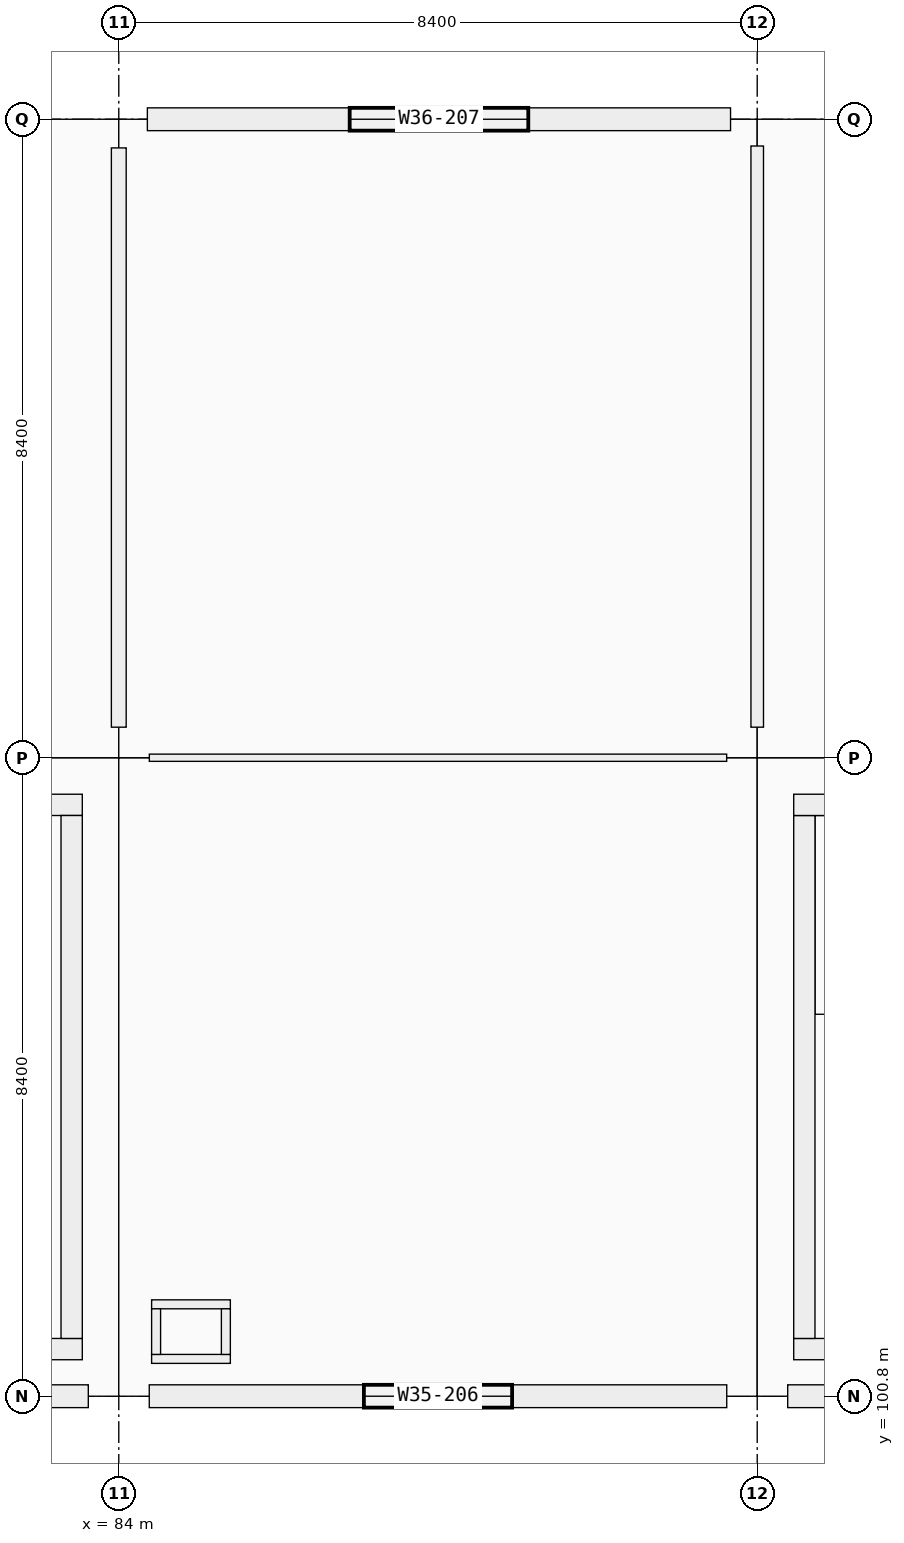
"""IFC4 building model, lengths in metres.
Left out: names, types, materials, properties, quantities, classifications, styles, units other than length and angle.
Written with IfcOpenShell. Run it as: python <this file> out.ifc"""

import sys

from ifc_helpers import new_model, si_unit, direction, frame, frame_2d, origin, origin_2d, place, context, subcontext, project, spatial, rectangle, extrude, element, fill, save


model = new_model("IFC4")
c1 = context("Model", 3, precision=1e-05, world=origin(), true_north=direction((0.0, 1.0)))
c2 = subcontext(c1, "Body", "Model", "MODEL_VIEW")
j1 = project(units=[si_unit("LENGTHUNIT", "METRE"), si_unit("PLANEANGLEUNIT", "RADIAN")], contexts=[c1])
p1 = place(None, origin())
s1 = spatial("IfcSite", under=j1, at=p1, CompositionType="ELEMENT")
p2 = place(p1, origin())
s2 = spatial("IfcBuilding", under=s1, at=p2, CompositionType="ELEMENT")
p3 = place(p2, frame((0.0, 0.0, 14.76)))
s3 = spatial("IfcBuildingStorey", under=s2, at=p3, CompositionType="ELEMENT", Elevation=14.76)
for number, where, z_axis, x_axis in (
    (1, (84.0, 100.8, 0.0), (0.0, 0.0, 1.0), (1.0, 0.0, 0.0)),
    (2, (84.0, 109.2, 0.0), (0.0, 0.0, 1.0), (1.0, 0.0, 0.0)),
):
    element("IfcColumn", number, at=place(p3, frame(where, z_axis=z_axis, x_axis=x_axis)), inside=s3, PredefinedType="COLUMN", context=c2, shape_type="SweptSolid", body=[
        extrude(rectangle(XDim=0.8, YDim=0.8, at=origin_2d()), origin(), (0.0, 0.0, 1.0), 4.32),
    ])
p4 = place(p3, frame((84.0, 117.6, 0.0), z_axis=(0.0, 0.0, 1.0), x_axis=(1.0, 0.0, 0.0)))
e3 = element("IfcColumn", 3, at=p4, inside=s3, PredefinedType="COLUMN", context=c2, shape_type="SweptSolid", body=[
    extrude(rectangle(XDim=0.75, YDim=0.75, at=origin_2d()), origin(), (0.0, 0.0, 1.0), 4.32),
])
for number, where, z_axis, x_axis in (
    (4, (92.4, 100.8, 0.0), (0.0, 0.0, 1.0), (1.0, 0.0, 0.0)),
    (5, (92.4, 109.2, 0.0), (0.0, 0.0, 1.0), (1.0, 0.0, 0.0)),
):
    element("IfcColumn", number, at=place(p3, frame(where, z_axis=z_axis, x_axis=x_axis)), inside=s3, PredefinedType="COLUMN", context=c2, shape_type="SweptSolid", body=[
        extrude(rectangle(XDim=0.8, YDim=0.8, at=origin_2d()), origin(), (0.0, 0.0, 1.0), 4.32),
    ])
p5 = place(p3, frame((92.4, 117.6, 0.0), z_axis=(0.0, 0.0, 1.0), x_axis=(1.0, 0.0, 0.0)))
e6 = element("IfcColumn", 6, at=p5, inside=s3, PredefinedType="COLUMN", context=c2, shape_type="SweptSolid", body=[
    extrude(rectangle(XDim=0.7, YDim=0.7, at=origin_2d()), origin(), (0.0, 0.0, 1.0), 4.32),
])
p6 = place(p3, frame((83.599, 100.8, 0.0), z_axis=(0.0, 0.0, 1.0), x_axis=(-1.0, 0.0, 0.0)))
e7 = element("IfcWall", 7, at=p6, inside=s3, PredefinedType="SOLIDWALL", context=c2, shape_type="SweptSolid", body=[
    extrude(rectangle(XDim=7.598, YDim=0.3, at=frame_2d((3.799, 0.0))), origin(), (0.0, 0.0, 1.0), 3.37),
])
p7 = place(p3, frame((91.999, 100.8, 0.0), z_axis=(0.0, 0.0, 1.0), x_axis=(-1.0, 0.0, 0.0)))
e8 = element("IfcWall", 8, at=p7, inside=s3, PredefinedType="SOLIDWALL", context=c2, shape_type="SweptSolid", body=[
    extrude(rectangle(XDim=7.598, YDim=0.3, at=frame_2d((3.799, 0.0))), origin(), (0.0, 0.0, 1.0), 3.37),
])
p8 = place(p7, frame((2.824, 0.0, 0.9)))
e9 = element("IfcOpeningElement", 9, at=p8, cuts=e8, PredefinedType="OPENING", context=c2, shape_type="SweptSolid", body=[
    extrude(rectangle(XDim=1.95, YDim=1.6, at=frame_2d((0.975, 0.8))), frame((0.0, 0.15, 0.0), z_axis=(0.0, -1.0, 0.0), x_axis=(1.0, 0.0, 0.0)), (0.0, 0.0, 1.0), 0.3),
])
p9 = place(p3, frame((84.376, 117.6, 0.0), z_axis=(0.0, 0.0, 1.0), x_axis=(1.0, 0.0, 0.0)))
e10 = element("IfcWall", 10, at=p9, inside=s3, PredefinedType="SOLIDWALL", context=c2, shape_type="SweptSolid", body=[
    extrude(rectangle(XDim=7.673, YDim=0.3, at=frame_2d((3.836, 0.0))), origin(), (0.0, 0.0, 1.0), 3.37),
])
p10 = place(p9, frame((2.662, 0.0, 0.9)))
e11 = element("IfcOpeningElement", 11, at=p10, cuts=e10, PredefinedType="OPENING", context=c2, shape_type="SweptSolid", body=[
    extrude(rectangle(XDim=2.35, YDim=1.6, at=frame_2d((1.175, 0.8))), frame((0.0, 0.15, 0.0), z_axis=(0.0, -1.0, 0.0), x_axis=(1.0, 0.0, 0.0)), (0.0, 0.0, 1.0), 0.3),
])
p11 = place(p3, frame((100.399, 100.8, 0.0), z_axis=(0.0, 0.0, 1.0), x_axis=(-1.0, 0.0, 0.0)))
e12 = element("IfcWall", 12, at=p11, inside=s3, PredefinedType="SOLIDWALL", context=c2, shape_type="SweptSolid", body=[
    extrude(rectangle(XDim=7.598, YDim=0.3, at=frame_2d((3.799, 0.0))), origin(), (0.0, 0.0, 1.0), 3.37),
])
for number, where, z_axis, x_axis in (
    (13, (83.52, 101.42, 0.0), (0.0, 0.0, 1.0), (-1.0, 0.0, 0.0)),
    (14, (76.08, 108.58, 0.0), (0.0, 0.0, 1.0), (1.0, 0.0, 0.0)),
):
    element("IfcWall", number, at=place(p3, frame(where, z_axis=z_axis, x_axis=x_axis)), inside=s3, PredefinedType="SHEAR", context=c2, shape_type="SweptSolid", body=[
        extrude(rectangle(XDim=7.44, YDim=0.28, at=frame_2d((3.72, 0.0))), origin(), (0.0, 0.0, 1.0), 4.32),
    ])
p12 = place(p3, frame((83.38, 108.44, 0.0), z_axis=(0.0, 0.0, 1.0), x_axis=(0.0, -1.0, 0.0)))
e15 = element("IfcWall", 15, at=p12, inside=s3, PredefinedType="SHEAR", context=c2, shape_type="SweptSolid", body=[
    extrude(rectangle(XDim=6.88, YDim=0.28, at=frame_2d((3.44, 0.0))), origin(), (0.0, 0.0, 1.0), 4.32),
])
p13 = place(p12, frame((3.99, 0.0, 0.0)))
e16 = element("IfcOpeningElement", 16, at=p13, cuts=e15, PredefinedType="OPENING", context=c2, shape_type="SweptSolid", body=[
    extrude(rectangle(XDim=1.5, YDim=2.15, at=frame_2d((0.75, 1.075))), frame((0.0, 0.14, 0.0), z_axis=(0.0, -1.0, 0.0), x_axis=(1.0, 0.0, 0.0)), (0.0, 0.0, 1.0), 0.28),
])
p14 = place(p3, frame((100.32, 101.42, 0.0), z_axis=(0.0, 0.0, 1.0), x_axis=(-1.0, 0.0, 0.0)))
e17 = element("IfcWall", 17, at=p14, inside=s3, PredefinedType="SHEAR", context=c2, shape_type="SweptSolid", body=[
    extrude(rectangle(XDim=7.44, YDim=0.28, at=frame_2d((3.72, 0.0))), origin(), (0.0, 0.0, 1.0), 4.32),
])
p15 = place(p3, frame((93.02, 101.56, 0.0), z_axis=(0.0, 0.0, 1.0), x_axis=(0.0, 1.0, 0.0)))
e18 = element("IfcWall", 18, at=p15, inside=s3, PredefinedType="SHEAR", context=c2, shape_type="SweptSolid", body=[
    extrude(rectangle(XDim=6.88, YDim=0.28, at=frame_2d((3.44, 0.0))), origin(), (0.0, 0.0, 1.0), 4.32),
])
p16 = place(p3, frame((92.88, 108.58, 0.0), z_axis=(0.0, 0.0, 1.0), x_axis=(1.0, 0.0, 0.0)))
e19 = element("IfcWall", 19, at=p16, inside=s3, PredefinedType="SHEAR", context=c2, shape_type="SweptSolid", body=[
    extrude(rectangle(XDim=7.44, YDim=0.28, at=frame_2d((3.72, 0.0))), origin(), (0.0, 0.0, 1.0), 4.32),
])
for number, where, z_axis, x_axis in (
    (20, (84.432, 101.291, 0.0), (0.0, 0.0, 1.0), (1.0, 0.0, 0.0)),
    (21, (84.432, 102.009, 0.0), (0.0, 0.0, 1.0), (1.0, 0.0, 0.0)),
):
    element("IfcWall", number, at=place(p3, frame(where, z_axis=z_axis, x_axis=x_axis)), inside=s3, PredefinedType="PARTITIONING", context=c2, shape_type="SweptSolid", body=[
        extrude(rectangle(XDim=1.036, YDim=0.118, at=frame_2d((0.518, 0.0))), origin(), (0.0, 0.0, 1.0), 3.35),
    ])
for number, where, z_axis, x_axis in (
    (22, (84.491, 101.35, 0.0), (0.0, 0.0, 1.0), (0.0, 1.0, 0.0)),
    (23, (85.409, 101.35, 0.0), (0.0, 0.0, 1.0), (0.0, 1.0, 0.0)),
):
    element("IfcWall", number, at=place(p3, frame(where, z_axis=z_axis, x_axis=x_axis)), inside=s3, PredefinedType="PARTITIONING", context=c2, shape_type="SweptSolid", body=[
        extrude(rectangle(XDim=0.6, YDim=0.118, at=frame_2d((0.3, 0.0))), origin(), (0.0, 0.0, 1.0), 3.35),
    ])
p17 = place(p3, frame((84.402, 109.2, 0.0), z_axis=(0.0, 0.0, 1.0), x_axis=(1.0, 0.0, 0.0)))
e24 = element("IfcWall", 24, at=p17, inside=s3, PredefinedType="PARTITIONING", context=c2, shape_type="SweptSolid", body=[
    extrude(rectangle(XDim=7.596, YDim=0.095, at=frame_2d((3.798, 0.0))), origin(), (0.0, 0.0, 1.0), 3.19),
])
p18 = place(p17, frame((3.308, 0.0, 0.0)))
e25 = element("IfcOpeningElement", 25, at=p18, cuts=e24, PredefinedType="OPENING", context=c2, shape_type="SweptSolid", body=[
    extrude(rectangle(XDim=0.98, YDim=2.18, at=frame_2d((0.49, 1.09))), frame((0.0, 0.047, 0.0), z_axis=(0.0, -1.0, 0.0), x_axis=(1.0, 0.0, 0.0)), (0.0, 0.0, 1.0), 0.095),
])
p19 = place(p3, frame((84.0, 109.602, 0.0), z_axis=(0.0, 0.0, 1.0), x_axis=(0.0, 1.0, 0.0)))
e26 = element("IfcWall", 26, at=p19, inside=s3, PredefinedType="PARTITIONING", context=c2, shape_type="SweptSolid", body=[
    extrude(rectangle(XDim=7.621, YDim=0.195, at=frame_2d((3.811, 0.0))), origin(), (0.0, 0.0, 1.0), 3.19),
])
p20 = place(p19, frame((3.301, 0.0, 0.0)))
e27 = element("IfcOpeningElement", 27, at=p20, cuts=e26, PredefinedType="OPENING", context=c2, shape_type="SweptSolid", body=[
    extrude(rectangle(XDim=1.02, YDim=2.2, at=frame_2d((0.51, 1.1))), frame((0.0, 0.098, 0.0), z_axis=(0.0, -1.0, 0.0), x_axis=(1.0, 0.0, 0.0)), (0.0, 0.0, 1.0), 0.195),
])
p21 = place(p3, frame((92.4, 109.602, 0.0), z_axis=(0.0, 0.0, 1.0), x_axis=(0.0, 1.0, 0.0)))
e28 = element("IfcWall", 28, at=p21, inside=s3, PredefinedType="PARTITIONING", context=c2, shape_type="SweptSolid", body=[
    extrude(rectangle(XDim=7.646, YDim=0.165, at=frame_2d((3.823, 0.0))), origin(), (0.0, 0.0, 1.0), 3.19),
])
p22 = place(p21, frame((3.323, 0.0, 0.0)))
e29 = element("IfcOpeningElement", 29, at=p22, cuts=e28, PredefinedType="OPENING", context=c2, shape_type="SweptSolid", body=[
    extrude(rectangle(XDim=1.0, YDim=2.2, at=frame_2d((0.5, 1.1))), frame((0.0, 0.083, 0.0), z_axis=(0.0, -1.0, 0.0), x_axis=(1.0, 0.0, 0.0)), (0.0, 0.0, 1.0), 0.165),
])
p23 = place(p8, origin())
e30 = element("IfcWindow", 30, at=p23, inside=s3, PartitioningType="SINGLE_PANEL", PredefinedType="WINDOW", context=c2, shape_type="SweptSolid", body=[
    extrude(rectangle(XDim=1.95, YDim=1.6, at=frame_2d((0.975, 0.8))), frame((0.0, 0.03, 0.0), z_axis=(0.0, -1.0, 0.0), x_axis=(1.0, 0.0, 0.0)), (0.0, 0.0, 1.0), 0.06),
])
fill(e9, e30)
p24 = place(p10, origin())
e31 = element("IfcWindow", 31, at=p24, inside=s3, PartitioningType="SINGLE_PANEL", PredefinedType="WINDOW", context=c2, shape_type="SweptSolid", body=[
    extrude(rectangle(XDim=2.35, YDim=1.6, at=frame_2d((1.175, 0.8))), frame((0.0, 0.03, 0.0), z_axis=(0.0, -1.0, 0.0), x_axis=(1.0, 0.0, 0.0)), (0.0, 0.0, 1.0), 0.06),
])
fill(e11, e31)
p25 = place(p13, origin())
e32 = element("IfcDoor", 32, at=p25, inside=s3, OperationType="DOUBLE_DOOR_SINGLE_SWING", PredefinedType="DOOR", context=c2, shape_type="SweptSolid", body=[
    extrude(rectangle(XDim=1.5, YDim=2.15, at=frame_2d((0.75, 1.075))), frame((0.0, 0.025, 0.0), z_axis=(0.0, -1.0, 0.0), x_axis=(1.0, 0.0, 0.0)), (0.0, 0.0, 1.0), 0.05),
])
fill(e16, e32)
p26 = place(p18, origin())
e33 = element("IfcDoor", 33, at=p26, inside=s3, OperationType="SINGLE_SWING_LEFT", PredefinedType="DOOR", context=c2, shape_type="SweptSolid", body=[
    extrude(rectangle(XDim=0.98, YDim=2.18, at=frame_2d((0.49, 1.09))), frame((0.0, 0.025, 0.0), z_axis=(0.0, -1.0, 0.0), x_axis=(1.0, 0.0, 0.0)), (0.0, 0.0, 1.0), 0.05),
])
fill(e25, e33)
p27 = place(p20, origin())
e34 = element("IfcDoor", 34, at=p27, inside=s3, OperationType="SINGLE_SWING_LEFT", PredefinedType="DOOR", context=c2, shape_type="SweptSolid", body=[
    extrude(rectangle(XDim=1.02, YDim=2.2, at=frame_2d((0.51, 1.1))), frame((0.0, 0.025, 0.0), z_axis=(0.0, -1.0, 0.0), x_axis=(1.0, 0.0, 0.0)), (0.0, 0.0, 1.0), 0.05),
])
fill(e27, e34)
p28 = place(p22, origin())
e35 = element("IfcDoor", 35, at=p28, inside=s3, OperationType="SINGLE_SWING_RIGHT", PredefinedType="DOOR", context=c2, shape_type="SweptSolid", body=[
    extrude(rectangle(XDim=1.0, YDim=2.2, at=frame_2d((0.5, 1.1))), frame((0.0, 0.025, 0.0), z_axis=(0.0, -1.0, 0.0), x_axis=(1.0, 0.0, 0.0)), (0.0, 0.0, 1.0), 0.05),
])
fill(e29, e35)
save(model, sys.argv[1])
